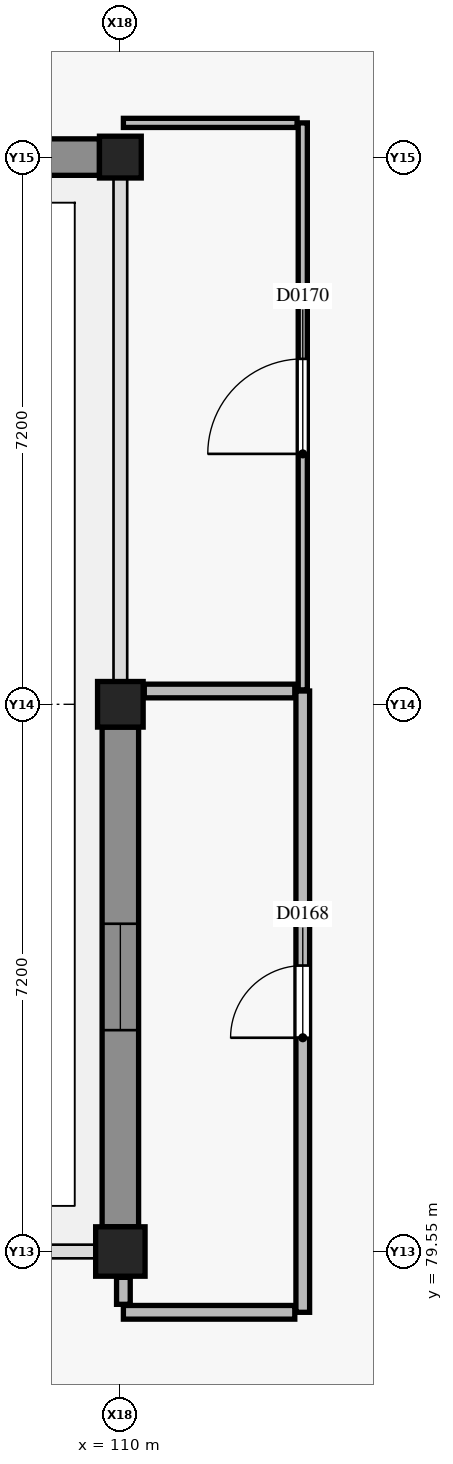
"""IFC4 building model, lengths in metres.
Left out: names, types, materials, properties, quantities, classifications, styles, units other than length and angle.
Written with IfcOpenShell. Run it as: python <this file> out.ifc"""

import sys

from ifc_helpers import new_model, si_unit, direction, frame, frame_2d, origin, origin_2d, place, context, subcontext, project, spatial, rectangle, extrude, element, fill, save


model = new_model("IFC4")
c1 = context("Model", 3, precision=1e-05, world=origin(), true_north=direction((0.0, 1.0)))
c2 = subcontext(c1, "Body", "Model", "MODEL_VIEW")
j1 = project(units=[si_unit("LENGTHUNIT", "METRE"), si_unit("PLANEANGLEUNIT", "RADIAN")], contexts=[c1])
p1 = place(None, origin())
s1 = spatial("IfcSite", under=j1, at=p1, CompositionType="ELEMENT")
p2 = place(p1, origin())
s2 = spatial("IfcBuilding", under=s1, at=p2, CompositionType="ELEMENT")
p3 = place(p2, origin())
s3 = spatial("IfcBuildingStorey", under=s2, at=p3, CompositionType="ELEMENT", Elevation=0.0)
p4 = place(p3, frame((110.0, 79.55, 0.0), z_axis=(0.0, 0.0, 1.0), x_axis=(1.0, 0.0, 0.0)))
e1 = element("IfcColumn", 1, at=p4, inside=s3, PredefinedType="COLUMN", context=c2, shape_type="SweptSolid", body=[
    extrude(rectangle(XDim=0.65, YDim=0.65, at=origin_2d()), origin(), (0.0, 0.0, 1.0), 4.8),
])
p5 = place(p3, frame((110.0, 86.75, 0.0), z_axis=(0.0, 0.0, 1.0), x_axis=(1.0, 0.0, 0.0)))
e2 = element("IfcColumn", 2, at=p5, inside=s3, PredefinedType="COLUMN", context=c2, shape_type="SweptSolid", body=[
    extrude(rectangle(XDim=0.6, YDim=0.6, at=origin_2d()), origin(), (0.0, 0.0, 1.0), 4.8),
])
p6 = place(p3, frame((110.0, 93.95, 0.0), z_axis=(0.0, 0.0, 1.0), x_axis=(1.0, 0.0, 0.0)))
e3 = element("IfcColumn", 3, at=p6, inside=s3, PredefinedType="COLUMN", context=c2, shape_type="SweptSolid", body=[
    extrude(rectangle(XDim=0.55, YDim=0.55, at=origin_2d()), origin(), (0.0, 0.0, 1.0), 4.8),
])
p7 = place(p3, frame((110.0, 79.875, 0.0), z_axis=(0.0, 0.0, 1.0), x_axis=(0.0, 1.0, 0.0)))
e4 = element("IfcWall", 4, at=p7, inside=s3, PredefinedType="SOLIDWALL", context=c2, shape_type="SweptSolid", body=[
    extrude(rectangle(XDim=6.575, YDim=0.48, at=frame_2d((3.288, 0.0))), origin(), (0.0, 0.0, 1.0), 3.73),
])
p8 = place(p7, frame((2.587, 0.0, 0.9)))
e5 = element("IfcOpeningElement", 5, at=p8, cuts=e4, PredefinedType="OPENING", context=c2, shape_type="SweptSolid", body=[
    extrude(rectangle(XDim=1.4, YDim=1.8, at=frame_2d((0.7, 0.9))), frame((0.0, 0.25, 0.0), z_axis=(0.0, -1.0, 0.0), x_axis=(1.0, 0.0, 0.0)), (0.0, 0.0, 1.0), 0.5),
])
p9 = place(p3, frame((109.725, 93.95, 0.0), z_axis=(0.0, 0.0, 1.0), x_axis=(-1.0, 0.0, 0.0)))
e6 = element("IfcWall", 6, at=p9, inside=s3, PredefinedType="SOLIDWALL", context=c2, shape_type="SweptSolid", body=[
    extrude(rectangle(XDim=6.7, YDim=0.48, at=frame_2d((3.35, 0.0))), origin(), (0.0, 0.0, 1.0), 3.73),
])
p10 = place(p9, frame((2.55, 0.0, 0.0)))
e7 = element("IfcOpeningElement", 7, at=p10, cuts=e6, PredefinedType="OPENING", context=c2, shape_type="SweptSolid", body=[
    extrude(rectangle(XDim=1.6, YDim=2.3, at=frame_2d((0.8, 1.15))), frame((0.0, 0.25, 0.0), z_axis=(0.0, -1.0, 0.0), x_axis=(1.0, 0.0, 0.0)), (0.0, 0.0, 1.0), 0.5),
])
p11 = place(p3, frame((112.4, 78.75, 0.0), z_axis=(0.0, 0.0, 1.0), x_axis=(0.0, 1.0, 0.0)))
e8 = element("IfcWall", 8, at=p11, inside=s3, PredefinedType="PLUMBINGWALL", context=c2, shape_type="SweptSolid", body=[
    extrude(rectangle(XDim=8.175, YDim=0.18, at=frame_2d((4.087, 0.0))), origin(), (0.0, 0.0, 1.0), 3.955),
])
p12 = place(p11, frame((3.613, 0.0, 0.0)))
e9 = element("IfcOpeningElement", 9, at=p12, cuts=e8, PredefinedType="OPENING", context=c2, shape_type="SweptSolid", body=[
    extrude(rectangle(XDim=0.95, YDim=2.1, at=frame_2d((0.475, 1.05))), frame((0.0, 0.1, 0.0), z_axis=(0.0, -1.0, 0.0), x_axis=(1.0, 0.0, 0.0)), (0.0, 0.0, 1.0), 0.2),
])
p13 = place(p3, frame((110.04, 78.75, 0.0), z_axis=(0.0, 0.0, 1.0), x_axis=(1.0, 0.0, 0.0)))
e10 = element("IfcWall", 10, at=p13, inside=s3, PredefinedType="PLUMBINGWALL", context=c2, shape_type="SweptSolid", body=[
    extrude(rectangle(XDim=2.255, YDim=0.18, at=frame_2d((1.127, 0.0))), origin(), (0.0, 0.0, 1.0), 4.015),
])
p14 = place(p3, frame((112.4, 86.94, 0.0), z_axis=(0.0, 0.0, 1.0), x_axis=(0.0, 1.0, 0.0)))
e11 = element("IfcWall", 11, at=p14, inside=s3, PredefinedType="PARTITIONING", context=c2, shape_type="SweptSolid", body=[
    extrude(rectangle(XDim=7.46, YDim=0.12, at=frame_2d((3.73, 0.0))), origin(), (0.0, 0.0, 1.0), 3.885),
])
p15 = place(p14, frame((3.105, 0.0, 0.0)))
e12 = element("IfcOpeningElement", 12, at=p15, cuts=e11, PredefinedType="OPENING", context=c2, shape_type="SweptSolid", body=[
    extrude(rectangle(XDim=1.25, YDim=2.15, at=frame_2d((0.625, 1.075))), frame((0.0, 0.07, 0.0), z_axis=(0.0, -1.0, 0.0), x_axis=(1.0, 0.0, 0.0)), (0.0, 0.0, 1.0), 0.14),
])
p16 = place(p3, frame((110.04, 94.4, 0.0), z_axis=(0.0, 0.0, 1.0), x_axis=(1.0, 0.0, 0.0)))
e13 = element("IfcWall", 13, at=p16, inside=s3, PredefinedType="PARTITIONING", context=c2, shape_type="SweptSolid", body=[
    extrude(rectangle(XDim=2.285, YDim=0.12, at=frame_2d((1.143, 0.0))), origin(), (0.0, 0.0, 1.0), 3.885),
])
p17 = place(p3, frame((110.315, 86.925, 0.0), z_axis=(0.0, 0.0, 1.0), x_axis=(1.0, 0.0, 0.0)))
e14 = element("IfcWall", 14, at=p17, inside=s3, PredefinedType="PLUMBINGWALL", context=c2, shape_type="SweptSolid", body=[
    extrude(rectangle(XDim=1.98, YDim=0.18, at=frame_2d((0.99, 0.0))), origin(), (0.0, 0.0, 1.0), 3.955),
])
p18 = place(p3, frame((110.04, 78.855, 0.0), z_axis=(0.0, 0.0, 1.0), x_axis=(0.0, 1.0, 0.0)))
e15 = element("IfcWall", 15, at=p18, inside=s3, PredefinedType="PLUMBINGWALL", context=c2, shape_type="SweptSolid", body=[
    extrude(rectangle(XDim=0.355, YDim=0.18, at=frame_2d((0.177, 0.0))), origin(), (0.0, 0.0, 1.0), 4.015),
])
p19 = place(p8, origin())
e16 = element("IfcWindow", 16, at=p19, inside=s3, PartitioningType="SINGLE_PANEL", PredefinedType="WINDOW", context=c2, shape_type="SweptSolid", body=[
    extrude(rectangle(XDim=1.4, YDim=1.8, at=frame_2d((0.7, 0.9))), frame((0.0, 0.03, 0.0), z_axis=(0.0, -1.0, 0.0), x_axis=(1.0, 0.0, 0.0)), (0.0, 0.0, 1.0), 0.06),
])
fill(e5, e16)
p20 = place(p12, origin())
e17 = element("IfcDoor", 17, at=p20, inside=s3, OperationType="SINGLE_SWING_LEFT", PredefinedType="DOOR", context=c2, shape_type="SweptSolid", body=[
    extrude(rectangle(XDim=0.95, YDim=2.1, at=frame_2d((0.475, 1.05))), frame((0.0, 0.025, 0.0), z_axis=(0.0, -1.0, 0.0), x_axis=(1.0, 0.0, 0.0)), (0.0, 0.0, 1.0), 0.05),
])
fill(e9, e17)
p21 = place(p15, origin())
e18 = element("IfcDoor", 18, at=p21, inside=s3, OperationType="SINGLE_SWING_LEFT", PredefinedType="DOOR", context=c2, shape_type="SweptSolid", body=[
    extrude(rectangle(XDim=1.25, YDim=2.15, at=frame_2d((0.625, 1.075))), frame((0.0, 0.025, 0.0), z_axis=(0.0, -1.0, 0.0), x_axis=(1.0, 0.0, 0.0)), (0.0, 0.0, 1.0), 0.05),
])
fill(e12, e18)
save(model, sys.argv[1])
